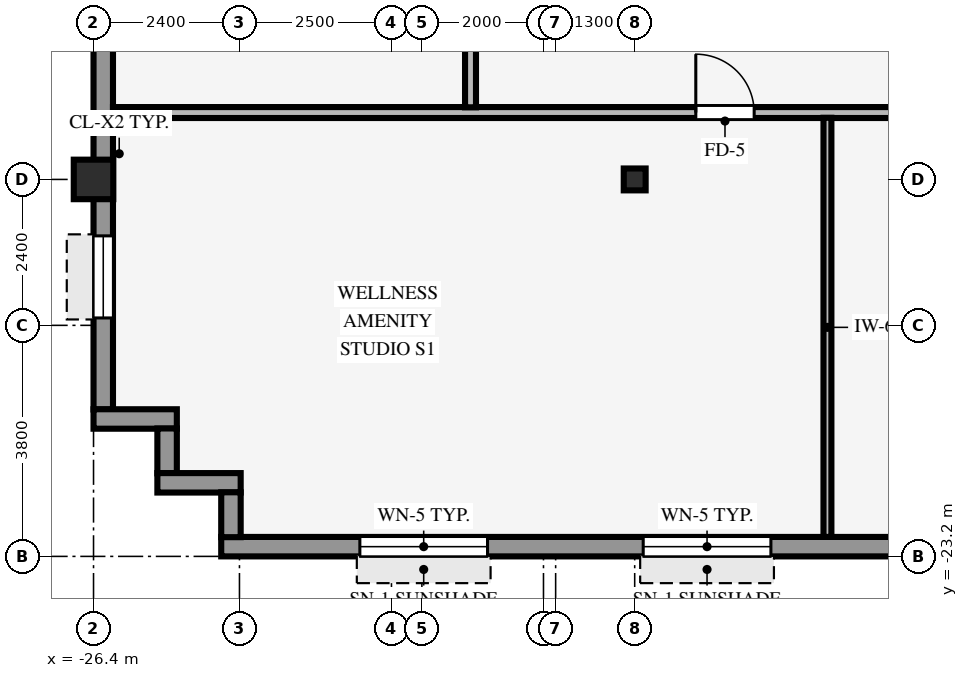
"""IFC4 building model, lengths in metres.
Left out: names, types, materials, properties, quantities, classifications, styles, units other than length and angle.
Written with IfcOpenShell. Run it as: python <this file> out.ifc"""

import sys

from ifc_helpers import new_model, si_unit, direction, frame, frame_2d, origin, origin_2d, place, context, subcontext, project, spatial, rectangle, hollow_rectangle, i_section, extrude, source, transform, mapped, element, fill, save


model = new_model("IFC4")
c1 = context("Model", 3, precision=1e-05, world=origin(), true_north=direction((0.0, 1.0)))
c2 = subcontext(c1, "Body", "Model", "MODEL_VIEW")
j1 = project(units=[si_unit("LENGTHUNIT", "METRE"), si_unit("PLANEANGLEUNIT", "RADIAN")], contexts=[c1])
p1 = place(None, origin())
s1 = spatial("IfcSite", under=j1, at=p1, CompositionType="ELEMENT")
p2 = place(p1, origin())
s2 = spatial("IfcBuilding", under=s1, at=p2, CompositionType="ELEMENT")
p3 = place(p2, frame((0.0, 0.0, 123.85)))
s3 = spatial("IfcBuildingStorey", under=s2, at=p3, CompositionType="ELEMENT", Elevation=123.85)
p4 = place(p3, frame((-26.4, -17.0, 0.0), z_axis=(0.0, 0.0, 1.0), x_axis=(1.0, 0.0, 0.0)))
e1 = element("IfcColumn", 1, at=p4, inside=s3, PredefinedType="COLUMN", context=c2, shape_type="SweptSolid", body=[
    extrude(hollow_rectangle(XDim=0.65, YDim=0.65, WallThickness=0.04, InnerFilletRadius=0.04, OuterFilletRadius=0.08, at=origin_2d()), origin(), (0.0, 0.0, 1.0), 3.37),
])
p5 = place(p3, frame((-17.5, -17.0, 0.0), z_axis=(0.0, 0.0, 1.0), x_axis=(1.0, 0.0, 0.0)))
e2 = element("IfcColumn", 2, at=p5, inside=s3, PredefinedType="COLUMN", context=c2, shape_type="SweptSolid", body=[
    extrude(i_section(OverallWidth=0.36, OverallDepth=0.36, WebThickness=0.021, FlangeThickness=0.021, FilletRadius=0.018, at=origin_2d()), origin(), (0.0, 0.0, 1.0), 3.37),
])
p6 = place(p3, frame((-24.3, -23.04, 0.0), z_axis=(0.0, 0.0, 1.0), x_axis=(1.0, 0.0, 0.0)))
e3 = element("IfcWall", 3, at=p6, inside=s3, PredefinedType="STANDARD", context=c2, shape_type="SweptSolid", body=[
    extrude(rectangle(XDim=48.6, YDim=0.32, at=frame_2d((24.3, 0.0))), origin(), (0.0, 0.0, 1.0), 2.705),
])
p7 = place(p6, frame((19.98, 0.0, 0.0), z_axis=(0.0, 0.0, 1.0), x_axis=(-1.0, 0.0, 0.0)))
e4 = element("IfcOpeningElement", 4, at=p7, cuts=e3, PredefinedType="OPENING", context=c2, shape_type="SweptSolid", body=[
    extrude(rectangle(XDim=0.98, YDim=2.15, at=frame_2d((0.49, 1.075))), frame((0.0, 0.17, 0.0), z_axis=(0.0, -1.0, 0.0), x_axis=(1.0, 0.0, 0.0)), (0.0, 0.0, 1.0), 0.34),
])
p8 = place(p6, frame((2.28, 0.0, 0.8)))
e5 = element("IfcOpeningElement", 5, at=p8, cuts=e3, PredefinedType="OPENING", context=c2, shape_type="SweptSolid", body=[
    extrude(rectangle(XDim=2.1, YDim=1.56, at=frame_2d((1.05, 0.78))), frame((0.0, 0.17, 0.0), z_axis=(0.0, -1.0, 0.0), x_axis=(1.0, 0.0, 0.0)), (0.0, 0.0, 1.0), 0.34),
])
p9 = place(p6, frame((6.94, 0.0, 0.8)))
e6 = element("IfcOpeningElement", 6, at=p9, cuts=e3, PredefinedType="OPENING", context=c2, shape_type="SweptSolid", body=[
    extrude(rectangle(XDim=2.1, YDim=1.56, at=frame_2d((1.05, 0.78))), frame((0.0, 0.17, 0.0), z_axis=(0.0, -1.0, 0.0), x_axis=(1.0, 0.0, 0.0)), (0.0, 0.0, 1.0), 0.34),
])
p10 = place(p6, frame((11.6, 0.0, 0.8)))
e7 = element("IfcOpeningElement", 7, at=p10, cuts=e3, PredefinedType="OPENING", context=c2, shape_type="SweptSolid", body=[
    extrude(rectangle(XDim=2.1, YDim=1.56, at=frame_2d((1.05, 0.78))), frame((0.0, 0.17, 0.0), z_axis=(0.0, -1.0, 0.0), x_axis=(1.0, 0.0, 0.0)), (0.0, 0.0, 1.0), 0.34),
])
p11 = place(p6, frame((16.26, 0.0, 0.8)))
e8 = element("IfcOpeningElement", 8, at=p11, cuts=e3, PredefinedType="OPENING", context=c2, shape_type="SweptSolid", body=[
    extrude(rectangle(XDim=2.1, YDim=1.56, at=frame_2d((1.05, 0.78))), frame((0.0, 0.17, 0.0), z_axis=(0.0, -1.0, 0.0), x_axis=(1.0, 0.0, 0.0)), (0.0, 0.0, 1.0), 0.34),
])
p12 = place(p6, frame((20.92, 0.0, 0.8)))
e9 = element("IfcOpeningElement", 9, at=p12, cuts=e3, PredefinedType="OPENING", context=c2, shape_type="SweptSolid", body=[
    extrude(rectangle(XDim=2.1, YDim=1.56, at=frame_2d((1.05, 0.78))), frame((0.0, 0.17, 0.0), z_axis=(0.0, -1.0, 0.0), x_axis=(1.0, 0.0, 0.0)), (0.0, 0.0, 1.0), 0.34),
])
p13 = place(p6, frame((25.58, 0.0, 0.8)))
e10 = element("IfcOpeningElement", 10, at=p13, cuts=e3, PredefinedType="OPENING", context=c2, shape_type="SweptSolid", body=[
    extrude(rectangle(XDim=2.1, YDim=1.56, at=frame_2d((1.05, 0.78))), frame((0.0, 0.17, 0.0), z_axis=(0.0, -1.0, 0.0), x_axis=(1.0, 0.0, 0.0)), (0.0, 0.0, 1.0), 0.34),
])
p14 = place(p6, frame((30.24, 0.0, 0.8)))
e11 = element("IfcOpeningElement", 11, at=p14, cuts=e3, PredefinedType="OPENING", context=c2, shape_type="SweptSolid", body=[
    extrude(rectangle(XDim=2.1, YDim=1.56, at=frame_2d((1.05, 0.78))), frame((0.0, 0.17, 0.0), z_axis=(0.0, -1.0, 0.0), x_axis=(1.0, 0.0, 0.0)), (0.0, 0.0, 1.0), 0.34),
])
p15 = place(p6, frame((34.9, 0.0, 0.8)))
e12 = element("IfcOpeningElement", 12, at=p15, cuts=e3, PredefinedType="OPENING", context=c2, shape_type="SweptSolid", body=[
    extrude(rectangle(XDim=2.1, YDim=1.56, at=frame_2d((1.05, 0.78))), frame((0.0, 0.17, 0.0), z_axis=(0.0, -1.0, 0.0), x_axis=(1.0, 0.0, 0.0)), (0.0, 0.0, 1.0), 0.34),
])
p16 = place(p6, frame((39.56, 0.0, 0.8)))
e13 = element("IfcOpeningElement", 13, at=p16, cuts=e3, PredefinedType="OPENING", context=c2, shape_type="SweptSolid", body=[
    extrude(rectangle(XDim=2.1, YDim=1.56, at=frame_2d((1.05, 0.78))), frame((0.0, 0.17, 0.0), z_axis=(0.0, -1.0, 0.0), x_axis=(1.0, 0.0, 0.0)), (0.0, 0.0, 1.0), 0.34),
])
p17 = place(p6, frame((44.22, 0.0, 0.8)))
e14 = element("IfcOpeningElement", 14, at=p17, cuts=e3, PredefinedType="OPENING", context=c2, shape_type="SweptSolid", body=[
    extrude(rectangle(XDim=2.1, YDim=1.56, at=frame_2d((1.05, 0.78))), frame((0.0, 0.17, 0.0), z_axis=(0.0, -1.0, 0.0), x_axis=(1.0, 0.0, 0.0)), (0.0, 0.0, 1.0), 0.34),
])
p18 = place(p3, frame((-26.24, -20.784, 0.0), z_axis=(0.0, 0.0, 1.0), x_axis=(0.0, 1.0, 0.0)))
e15 = element("IfcWall", 15, at=p18, inside=s3, PredefinedType="STANDARD", context=c2, shape_type="SweptSolid", body=[
    extrude(rectangle(XDim=17.184, YDim=0.32, at=frame_2d((8.592, 0.0))), origin(), (0.0, 0.0, 1.0), 2.705),
])
p19 = place(p18, frame((1.506, 0.0, 0.8)))
e16 = element("IfcOpeningElement", 16, at=p19, cuts=e15, PredefinedType="OPENING", context=c2, shape_type="SweptSolid", body=[
    extrude(rectangle(XDim=1.35, YDim=1.56, at=frame_2d((0.675, 0.78))), frame((0.0, 0.17, 0.0), z_axis=(0.0, -1.0, 0.0), x_axis=(1.0, 0.0, 0.0)), (0.0, 0.0, 1.0), 0.34),
])
p20 = place(p18, frame((7.917, 0.0, 0.8)))
e17 = element("IfcOpeningElement", 17, at=p20, cuts=e15, PredefinedType="OPENING", context=c2, shape_type="SweptSolid", body=[
    extrude(rectangle(XDim=1.35, YDim=1.56, at=frame_2d((0.675, 0.78))), frame((0.0, 0.17, 0.0), z_axis=(0.0, -1.0, 0.0), x_axis=(1.0, 0.0, 0.0)), (0.0, 0.0, 1.0), 0.34),
])
p21 = place(p18, frame((12.978, 0.0, 0.8)))
e18 = element("IfcOpeningElement", 18, at=p21, cuts=e15, PredefinedType="OPENING", context=c2, shape_type="SweptSolid", body=[
    extrude(rectangle(XDim=1.35, YDim=1.56, at=frame_2d((0.675, 0.78))), frame((0.0, 0.17, 0.0), z_axis=(0.0, -1.0, 0.0), x_axis=(1.0, 0.0, 0.0)), (0.0, 0.0, 1.0), 0.34),
])
p22 = place(p3, frame((-26.4, -20.94, 0.0), z_axis=(0.0, 0.0, 1.0), x_axis=(1.0, 0.0, 0.0)))
e19 = element("IfcWall", 19, at=p22, inside=s3, PredefinedType="STANDARD", context=c2, shape_type="SweptSolid", body=[
    extrude(rectangle(XDim=1.37, YDim=0.32, at=frame_2d((0.685, 0.0))), origin(), (0.0, 0.0, 1.0), 3.36),
])
p23 = place(p3, frame((-25.19, -21.834, 0.0), z_axis=(0.0, 0.0, 1.0), x_axis=(0.0, 1.0, 0.0)))
e20 = element("IfcWall", 20, at=p23, inside=s3, PredefinedType="STANDARD", context=c2, shape_type="SweptSolid", body=[
    extrude(rectangle(XDim=0.738, YDim=0.32, at=frame_2d((0.369, 0.0))), origin(), (0.0, 0.0, 1.0), 3.36),
])
p24 = place(p3, frame((-25.35, -21.99, 0.0), z_axis=(0.0, 0.0, 1.0), x_axis=(1.0, 0.0, 0.0)))
e21 = element("IfcWall", 21, at=p24, inside=s3, PredefinedType="STANDARD", context=c2, shape_type="SweptSolid", body=[
    extrude(rectangle(XDim=1.37, YDim=0.32, at=frame_2d((0.685, 0.0))), origin(), (0.0, 0.0, 1.0), 3.36),
])
p25 = place(p3, frame((-24.14, -22.884, 0.0), z_axis=(0.0, 0.0, 1.0), x_axis=(0.0, 1.0, 0.0)))
e22 = element("IfcWall", 22, at=p25, inside=s3, PredefinedType="STANDARD", context=c2, shape_type="SweptSolid", body=[
    extrude(rectangle(XDim=0.738, YDim=0.32, at=frame_2d((0.369, 0.0))), origin(), (0.0, 0.0, 1.0), 3.36),
])
p26 = place(p3, frame((-26.08, -15.9, 0.0), z_axis=(0.0, 0.0, 1.0), x_axis=(1.0, 0.0, 0.0)))
e23 = element("IfcWall", 23, at=p26, inside=s3, PredefinedType="PARTITIONING", context=c2, shape_type="SweptSolid", body=[
    extrude(rectangle(XDim=52.16, YDim=0.18, at=frame_2d((26.08, 0.0))), origin(), (0.0, 0.0, 1.0), 3.36),
])
p27 = place(p26, frame((18.11, 0.0, 0.0)))
e24 = element("IfcOpeningElement", 24, at=p27, cuts=e23, PredefinedType="OPENING", context=c2, shape_type="SweptSolid", body=[
    extrude(rectangle(XDim=0.96, YDim=2.1, at=frame_2d((0.48, 1.05))), frame((0.0, 0.1, 0.0), z_axis=(0.0, -1.0, 0.0), x_axis=(1.0, 0.0, 0.0)), (0.0, 0.0, 1.0), 0.2),
])
p28 = place(p26, frame((40.905, 0.0, 0.0)))
e25 = element("IfcOpeningElement", 25, at=p28, cuts=e23, PredefinedType="OPENING", context=c2, shape_type="SweptSolid", body=[
    extrude(rectangle(XDim=0.96, YDim=2.1, at=frame_2d((0.48, 1.05))), frame((0.0, 0.1, 0.0), z_axis=(0.0, -1.0, 0.0), x_axis=(1.0, 0.0, 0.0)), (0.0, 0.0, 1.0), 0.2),
])
p29 = place(p26, frame((28.575, 0.0, 0.0)))
e26 = element("IfcOpeningElement", 26, at=p29, cuts=e23, PredefinedType="OPENING", context=c2, shape_type="SweptSolid", body=[
    extrude(rectangle(XDim=0.96, YDim=2.1, at=frame_2d((0.48, 1.05))), frame((0.0, 0.1, 0.0), z_axis=(0.0, -1.0, 0.0), x_axis=(1.0, 0.0, 0.0)), (0.0, 0.0, 1.0), 0.2),
])
p30 = place(p26, frame((9.585, 0.0, 0.0)))
e27 = element("IfcOpeningElement", 27, at=p30, cuts=e23, PredefinedType="OPENING", context=c2, shape_type="SweptSolid", body=[
    extrude(rectangle(XDim=0.96, YDim=2.1, at=frame_2d((0.48, 1.05))), frame((0.0, 0.1, 0.0), z_axis=(0.0, -1.0, 0.0), x_axis=(1.0, 0.0, 0.0)), (0.0, 0.0, 1.0), 0.2),
])
p31 = place(p3, frame((-20.2, -15.814, 0.0), z_axis=(0.0, 0.0, 1.0), x_axis=(0.0, 1.0, 0.0)))
e28 = element("IfcWall", 28, at=p31, inside=s3, PredefinedType="PARTITIONING", context=c2, shape_type="SweptSolid", body=[
    extrude(rectangle(XDim=31.628, YDim=0.18, at=frame_2d((15.814, 0.0))), origin(), (0.0, 0.0, 1.0), 3.36),
])
p32 = place(p31, frame((15.334, 0.0, 0.0)))
e29 = element("IfcOpeningElement", 29, at=p32, cuts=e28, PredefinedType="OPENING", context=c2, shape_type="SweptSolid", body=[
    extrude(rectangle(XDim=0.96, YDim=2.1, at=frame_2d((0.48, 1.05))), frame((0.0, 0.1, 0.0), z_axis=(0.0, -1.0, 0.0), x_axis=(1.0, 0.0, 0.0)), (0.0, 0.0, 1.0), 0.2),
])
p33 = place(p3, frame((-14.33, -22.88, 0.0), z_axis=(0.0, 0.0, 1.0), x_axis=(0.0, 1.0, 0.0)))
e30 = element("IfcWall", 30, at=p33, inside=s3, PredefinedType="PARTITIONING", context=c2, shape_type="SweptSolid", body=[
    extrude(rectangle(XDim=6.894, YDim=0.13, at=frame_2d((3.447, 0.0))), origin(), (0.0, 0.0, 1.0), 3.36),
])
m1 = source(origin(), c2, "Body", "SweptSolid", [
    extrude(rectangle(XDim=2.1, YDim=1.56, at=frame_2d((1.05, 0.78))), frame((0.0, 0.03, 0.0), z_axis=(0.0, -1.0, 0.0), x_axis=(1.0, 0.0, 0.0)), (0.0, 0.0, 1.0), 0.06),
])
p34 = place(p8, origin())
e31 = element("IfcWindow", 31, at=p34, inside=s3, PartitioningType="SINGLE_PANEL", PredefinedType="WINDOW", context=c2, shape_type="MappedRepresentation", body=[
    mapped(m1, transform((0.0, 0.0, 0.0), scale=1.0)),
])
fill(e5, e31)
p35 = place(p9, origin())
e32 = element("IfcWindow", 32, at=p35, inside=s3, PartitioningType="SINGLE_PANEL", PredefinedType="WINDOW", context=c2, shape_type="MappedRepresentation", body=[
    mapped(m1, transform((0.0, 0.0, 0.0), scale=1.0)),
])
fill(e6, e32)
m2 = source(origin(), c2, "Body", "SweptSolid", [
    extrude(rectangle(XDim=1.35, YDim=1.56, at=frame_2d((0.675, 0.78))), frame((0.0, 0.03, 0.0), z_axis=(0.0, -1.0, 0.0), x_axis=(1.0, 0.0, 0.0)), (0.0, 0.0, 1.0), 0.06),
])
p36 = place(p19, origin())
e33 = element("IfcWindow", 33, at=p36, inside=s3, PartitioningType="SINGLE_PANEL", PredefinedType="WINDOW", context=c2, shape_type="MappedRepresentation", body=[
    mapped(m2, transform((0.0, 0.0, 0.0), scale=1.0)),
])
fill(e16, e33)
m3 = source(origin(), c2, "Body", "SweptSolid", [
    extrude(rectangle(XDim=0.96, YDim=2.1, at=frame_2d((0.48, 1.05))), frame((0.0, 0.025, 0.0), z_axis=(0.0, -1.0, 0.0), x_axis=(1.0, 0.0, 0.0)), (0.0, 0.0, 1.0), 0.05),
])
p37 = place(p30, origin())
e34 = element("IfcDoor", 34, at=p37, inside=s3, OperationType="SINGLE_SWING_LEFT", PredefinedType="DOOR", context=c2, shape_type="MappedRepresentation", body=[
    mapped(m3, transform((0.0, 0.0, 0.0), scale=1.0)),
])
fill(e27, e34)
save(model, sys.argv[1])
